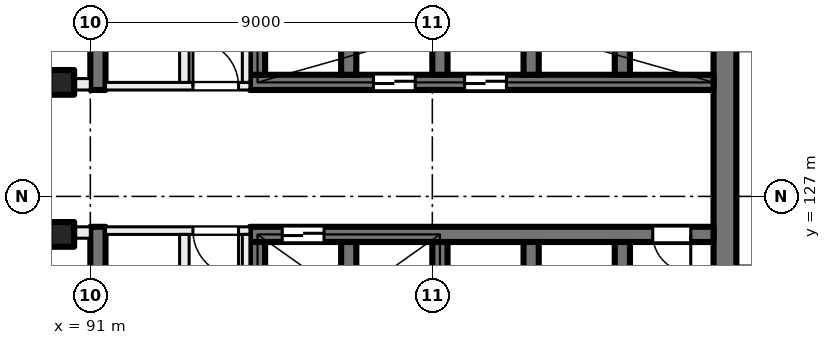
"""IFC4 building model, lengths in metres.
Left out: names, types, materials, properties, quantities, classifications, styles, units other than length and angle.
Written with IfcOpenShell. Run it as: python <this file> out.ifc"""

import sys

from ifc_helpers import new_model, si_unit, direction, frame, frame_2d, origin, origin_2d, place, context, subcontext, project, spatial, rectangle, extrude, element, fill, save


model = new_model("IFC4")
c1 = context("Model", 3, precision=1e-05, world=origin(), true_north=direction((0.0, 1.0)))
c2 = subcontext(c1, "Body", "Model", "MODEL_VIEW")
j1 = project(units=[si_unit("LENGTHUNIT", "METRE"), si_unit("PLANEANGLEUNIT", "RADIAN")], contexts=[c1])
p1 = place(None, origin())
s1 = spatial("IfcSite", under=j1, at=p1, CompositionType="ELEMENT")
p2 = place(p1, origin())
s2 = spatial("IfcBuilding", under=s1, at=p2, CompositionType="ELEMENT")
p3 = place(p2, frame((0.0, 0.0, 113.0)))
s3 = spatial("IfcBuildingStorey", under=s2, at=p3, CompositionType="ELEMENT", Elevation=113.0)
for number, where, z_axis, x_axis in (
    (1, (90.25, 130.0, 0.0), (0.0, 0.0, 1.0), (1.0, 0.0, 0.0)),
    (2, (90.25, 126.0, 0.0), (0.0, 0.0, 1.0), (1.0, 0.0, 0.0)),
):
    element("IfcColumn", number, at=place(p3, frame(where, z_axis=z_axis, x_axis=x_axis)), inside=s3, PredefinedType="COLUMN", context=c2, shape_type="SweptSolid", body=[
        extrude(rectangle(XDim=0.65, YDim=0.65, at=origin_2d()), origin(), (0.0, 0.0, 1.0), 4.0),
    ])
p4 = place(p3, frame((107.7, 135.2, 0.0), z_axis=(0.0, 0.0, 1.0), x_axis=(0.0, -1.0, 0.0)))
e3 = element("IfcWall", 3, at=p4, inside=s3, PredefinedType="SHEAR", context=c2, shape_type="SweptSolid", body=[
    extrude(rectangle(XDim=14.4, YDim=0.6, at=frame_2d((7.2, 0.0))), origin(), (0.0, 0.0, 1.0), 4.0),
])
p5 = place(p3, frame((107.4, 130.0, 0.0), z_axis=(0.0, 0.0, 1.0), x_axis=(-1.0, 0.0, 0.0)))
e4 = element("IfcWall", 4, at=p5, inside=s3, PredefinedType="SHEAR", context=c2, shape_type="SweptSolid", body=[
    extrude(rectangle(XDim=12.2, YDim=0.4, at=frame_2d((6.1, 0.0))), origin(), (0.0, 0.0, 1.0), 4.0),
])
p6 = place(p5, frame((5.45, 0.0, 0.0)))
e5 = element("IfcOpeningElement", 5, at=p6, cuts=e4, PredefinedType="OPENING", context=c2, shape_type="SweptSolid", body=[
    extrude(rectangle(XDim=1.1, YDim=2.1, at=frame_2d((0.55, 1.05))), frame((0.0, 0.21, 0.0), z_axis=(0.0, -1.0, 0.0), x_axis=(1.0, 0.0, 0.0)), (0.0, 0.0, 1.0), 0.42),
])
p7 = place(p5, frame((7.85, 0.0, 0.0)))
e6 = element("IfcOpeningElement", 6, at=p7, cuts=e4, PredefinedType="OPENING", context=c2, shape_type="SweptSolid", body=[
    extrude(rectangle(XDim=1.1, YDim=2.1, at=frame_2d((0.55, 1.05))), frame((0.0, 0.21, 0.0), z_axis=(0.0, -1.0, 0.0), x_axis=(1.0, 0.0, 0.0)), (0.0, 0.0, 1.0), 0.42),
])
for number, where, z_axis, x_axis in (
    (7, (105.0, 133.2, 0.0), (0.0, 0.0, 1.0), (0.0, -1.0, 0.0)),
    (8, (102.6, 133.2, 0.0), (0.0, 0.0, 1.0), (0.0, -1.0, 0.0)),
    (9, (100.2, 133.2, 0.0), (0.0, 0.0, 1.0), (0.0, -1.0, 0.0)),
    (10, (97.8, 133.2, 0.0), (0.0, 0.0, 1.0), (0.0, -1.0, 0.0)),
    (11, (95.4, 133.2, 0.0), (0.0, 0.0, 1.0), (0.0, -1.0, 0.0)),
):
    element("IfcWall", number, at=place(p3, frame(where, z_axis=z_axis, x_axis=x_axis)), inside=s3, PredefinedType="SHEAR", context=c2, shape_type="SweptSolid", body=[
        extrude(rectangle(XDim=3.0, YDim=0.4, at=frame_2d((1.5, 0.0))), origin(), (0.0, 0.0, 1.0), 4.0),
    ])
p8 = place(p3, frame((107.4, 126.0, 0.0), z_axis=(0.0, 0.0, 1.0), x_axis=(-1.0, 0.0, 0.0)))
e12 = element("IfcWall", 12, at=p8, inside=s3, PredefinedType="SHEAR", context=c2, shape_type="SweptSolid", body=[
    extrude(rectangle(XDim=12.2, YDim=0.4, at=frame_2d((6.1, 0.0))), origin(), (0.0, 0.0, 1.0), 4.0),
])
p9 = place(p8, frame((10.25, 0.0, 0.0)))
e13 = element("IfcOpeningElement", 13, at=p9, cuts=e12, PredefinedType="OPENING", context=c2, shape_type="SweptSolid", body=[
    extrude(rectangle(XDim=1.1, YDim=2.1, at=frame_2d((0.55, 1.05))), frame((0.0, 0.21, 0.0), z_axis=(0.0, -1.0, 0.0), x_axis=(1.0, 0.0, 0.0)), (0.0, 0.0, 1.0), 0.42),
])
p10 = place(p8, frame((0.6, 0.0, 0.0)))
e14 = element("IfcOpeningElement", 14, at=p10, cuts=e12, PredefinedType="OPENING", context=c2, shape_type="SweptSolid", body=[
    extrude(rectangle(XDim=1.0, YDim=2.1, at=frame_2d((0.5, 1.05))), frame((0.0, 0.21, 0.0), z_axis=(0.0, -1.0, 0.0), x_axis=(1.0, 0.0, 0.0)), (0.0, 0.0, 1.0), 0.42),
])
for number, where, z_axis, x_axis in (
    (15, (105.0, 125.8, 0.0), (0.0, 0.0, 1.0), (0.0, -1.0, 0.0)),
    (16, (102.6, 125.8, 0.0), (0.0, 0.0, 1.0), (0.0, -1.0, 0.0)),
    (17, (100.2, 125.8, 0.0), (0.0, 0.0, 1.0), (0.0, -1.0, 0.0)),
    (18, (97.8, 125.8, 0.0), (0.0, 0.0, 1.0), (0.0, -1.0, 0.0)),
    (19, (95.4, 125.8, 0.0), (0.0, 0.0, 1.0), (0.0, -1.0, 0.0)),
):
    element("IfcWall", number, at=place(p3, frame(where, z_axis=z_axis, x_axis=x_axis)), inside=s3, PredefinedType="SHEAR", context=c2, shape_type="SweptSolid", body=[
        extrude(rectangle(XDim=3.0, YDim=0.4, at=frame_2d((1.5, 0.0))), origin(), (0.0, 0.0, 1.0), 4.0),
    ])
for number, where, z_axis, x_axis in (
    (20, (91.2, 138.4, 0.0), (0.0, 0.0, 1.0), (0.0, -1.0, 0.0)),
    (21, (91.2, 126.2, 0.0), (0.0, 0.0, 1.0), (0.0, -1.0, 0.0)),
):
    element("IfcWall", number, at=place(p3, frame(where, z_axis=z_axis, x_axis=x_axis)), inside=s3, PredefinedType="SHEAR", context=c2, shape_type="SweptSolid", body=[
        extrude(rectangle(XDim=8.6, YDim=0.4, at=frame_2d((4.3, 0.0))), origin(), (0.0, 0.0, 1.0), 4.0),
    ])
p11 = place(p3, frame((95.2, 126.1, 0.0), z_axis=(0.0, 0.0, 1.0), x_axis=(-1.0, 0.0, 0.0)))
e22 = element("IfcWall", 22, at=p11, inside=s3, PredefinedType="PARTITIONING", context=c2, shape_type="SweptSolid", body=[
    extrude(rectangle(XDim=3.8, YDim=0.2, at=frame_2d((1.9, 0.0))), origin(), (0.0, 0.0, 1.0), 3.625),
])
p12 = place(p11, frame((0.3, 0.0, 0.0)))
e23 = element("IfcOpeningElement", 23, at=p12, cuts=e22, PredefinedType="OPENING", context=c2, shape_type="SweptSolid", body=[
    extrude(rectangle(XDim=1.2, YDim=2.1, at=frame_2d((0.6, 1.05))), frame((0.0, 0.11, 0.0), z_axis=(0.0, -1.0, 0.0), x_axis=(1.0, 0.0, 0.0)), (0.0, 0.0, 1.0), 0.22),
])
p13 = place(p3, frame((95.1, 117.6, 0.0), z_axis=(0.0, 0.0, 1.0), x_axis=(0.0, 1.0, 0.0)))
e24 = element("IfcWall", 24, at=p13, inside=s3, PredefinedType="PARTITIONING", context=c2, shape_type="SweptSolid", body=[
    extrude(rectangle(XDim=8.4, YDim=0.2, at=frame_2d((4.2, 0.0))), origin(), (0.0, 0.0, 1.0), 3.625),
])
p14 = place(p13, frame((1.65, 0.0, 0.0)))
e25 = element("IfcOpeningElement", 25, at=p14, cuts=e24, PredefinedType="OPENING", context=c2, shape_type="SweptSolid", body=[
    extrude(rectangle(XDim=1.5, YDim=2.1, at=frame_2d((0.75, 1.05))), frame((0.0, 0.11, 0.0), z_axis=(0.0, -1.0, 0.0), x_axis=(1.0, 0.0, 0.0)), (0.0, 0.0, 1.0), 0.22),
])
p15 = place(p3, frame((93.475, 117.6, 0.0), z_axis=(0.0, 0.0, 1.0), x_axis=(0.0, 1.0, 0.0)))
e26 = element("IfcWall", 26, at=p15, inside=s3, PredefinedType="PARTITIONING", context=c2, shape_type="SweptSolid", body=[
    extrude(rectangle(XDim=8.4, YDim=0.25, at=frame_2d((4.2, 0.0))), origin(), (0.0, 0.0, 1.0), 3.625),
])
p16 = place(p15, frame((6.625, 0.0, 0.0)))
e27 = element("IfcOpeningElement", 27, at=p16, cuts=e26, PredefinedType="OPENING", context=c2, shape_type="SweptSolid", body=[
    extrude(rectangle(XDim=0.8, YDim=2.1, at=frame_2d((0.4, 1.05))), frame((0.0, 0.135, 0.0), z_axis=(0.0, -1.0, 0.0), x_axis=(1.0, 0.0, 0.0)), (0.0, 0.0, 1.0), 0.27),
])
p17 = place(p15, frame((2.375, 0.0, 0.0)))
e28 = element("IfcOpeningElement", 28, at=p17, cuts=e26, PredefinedType="OPENING", context=c2, shape_type="SweptSolid", body=[
    extrude(rectangle(XDim=0.8, YDim=2.1, at=frame_2d((0.4, 1.05))), frame((0.0, 0.135, 0.0), z_axis=(0.0, -1.0, 0.0), x_axis=(1.0, 0.0, 0.0)), (0.0, 0.0, 1.0), 0.27),
])
p18 = place(p3, frame((91.4, 129.9, 0.0), z_axis=(0.0, 0.0, 1.0), x_axis=(1.0, 0.0, 0.0)))
e29 = element("IfcWall", 29, at=p18, inside=s3, PredefinedType="PARTITIONING", context=c2, shape_type="SweptSolid", body=[
    extrude(rectangle(XDim=3.8, YDim=0.2, at=frame_2d((1.9, 0.0))), origin(), (0.0, 0.0, 1.0), 3.625),
])
p19 = place(p18, frame((2.3, 0.0, 0.0)))
e30 = element("IfcOpeningElement", 30, at=p19, cuts=e29, PredefinedType="OPENING", context=c2, shape_type="SweptSolid", body=[
    extrude(rectangle(XDim=1.2, YDim=2.1, at=frame_2d((0.6, 1.05))), frame((0.0, 0.11, 0.0), z_axis=(0.0, -1.0, 0.0), x_axis=(1.0, 0.0, 0.0)), (0.0, 0.0, 1.0), 0.22),
])
p20 = place(p3, frame((95.1, 130.0, 0.0), z_axis=(0.0, 0.0, 1.0), x_axis=(0.0, 1.0, 0.0)))
e31 = element("IfcWall", 31, at=p20, inside=s3, PredefinedType="PARTITIONING", context=c2, shape_type="SweptSolid", body=[
    extrude(rectangle(XDim=8.4, YDim=0.2, at=frame_2d((4.2, 0.0))), origin(), (0.0, 0.0, 1.0), 3.625),
])
p21 = place(p20, frame((5.25, 0.0, 0.0)))
e32 = element("IfcOpeningElement", 32, at=p21, cuts=e31, PredefinedType="OPENING", context=c2, shape_type="SweptSolid", body=[
    extrude(rectangle(XDim=1.5, YDim=2.1, at=frame_2d((0.75, 1.05))), frame((0.0, 0.11, 0.0), z_axis=(0.0, -1.0, 0.0), x_axis=(1.0, 0.0, 0.0)), (0.0, 0.0, 1.0), 0.22),
])
p22 = place(p3, frame((93.475, 130.0, 0.0), z_axis=(0.0, 0.0, 1.0), x_axis=(0.0, 1.0, 0.0)))
e33 = element("IfcWall", 33, at=p22, inside=s3, PredefinedType="PARTITIONING", context=c2, shape_type="SweptSolid", body=[
    extrude(rectangle(XDim=8.4, YDim=0.25, at=frame_2d((4.2, 0.0))), origin(), (0.0, 0.0, 1.0), 3.625),
])
p23 = place(p22, frame((2.275, 0.0, 0.0)))
e34 = element("IfcOpeningElement", 34, at=p23, cuts=e33, PredefinedType="OPENING", context=c2, shape_type="SweptSolid", body=[
    extrude(rectangle(XDim=1.0, YDim=2.1, at=frame_2d((0.5, 1.05))), frame((0.0, 0.135, 0.0), z_axis=(0.0, -1.0, 0.0), x_axis=(1.0, 0.0, 0.0)), (0.0, 0.0, 1.0), 0.27),
])
p24 = place(p22, frame((6.625, 0.0, 0.0)))
e35 = element("IfcOpeningElement", 35, at=p24, cuts=e33, PredefinedType="OPENING", context=c2, shape_type="SweptSolid", body=[
    extrude(rectangle(XDim=0.8, YDim=2.1, at=frame_2d((0.4, 1.05))), frame((0.0, 0.135, 0.0), z_axis=(0.0, -1.0, 0.0), x_axis=(1.0, 0.0, 0.0)), (0.0, 0.0, 1.0), 0.27),
])
p25 = place(p3, frame((72.5, 129.95, 0.0), z_axis=(0.0, 0.0, 1.0), x_axis=(1.0, 0.0, 0.0)))
e36 = element("IfcWall", 36, at=p25, inside=s3, PredefinedType="PARTITIONING", context=c2, shape_type="SweptSolid", body=[
    extrude(rectangle(XDim=18.5, YDim=0.3, at=frame_2d((9.25, 0.0))), origin(), (0.0, 0.0, 1.0), 3.625),
])
p26 = place(p25, frame((14.375, 0.0, 0.0)))
e37 = element("IfcOpeningElement", 37, at=p26, cuts=e36, PredefinedType="OPENING", context=c2, shape_type="SweptSolid", body=[
    extrude(rectangle(XDim=1.0, YDim=2.1, at=frame_2d((0.5, 1.05))), frame((0.0, 0.16, 0.0), z_axis=(0.0, -1.0, 0.0), x_axis=(1.0, 0.0, 0.0)), (0.0, 0.0, 1.0), 0.32),
])
p27 = place(p25, frame((6.0, 0.0, 0.0)))
e38 = element("IfcOpeningElement", 38, at=p27, cuts=e36, PredefinedType="OPENING", context=c2, shape_type="SweptSolid", body=[
    extrude(rectangle(XDim=1.0, YDim=2.1, at=frame_2d((0.5, 1.05))), frame((0.0, 0.16, 0.0), z_axis=(0.0, -1.0, 0.0), x_axis=(1.0, 0.0, 0.0)), (0.0, 0.0, 1.0), 0.32),
])
p28 = place(p25, frame((1.625, 0.0, 0.0)))
e39 = element("IfcOpeningElement", 39, at=p28, cuts=e36, PredefinedType="OPENING", context=c2, shape_type="SweptSolid", body=[
    extrude(rectangle(XDim=1.0, YDim=2.1, at=frame_2d((0.5, 1.05))), frame((0.0, 0.16, 0.0), z_axis=(0.0, -1.0, 0.0), x_axis=(1.0, 0.0, 0.0)), (0.0, 0.0, 1.0), 0.32),
])
p29 = place(p3, frame((91.0, 126.05, 0.0), z_axis=(0.0, 0.0, 1.0), x_axis=(-1.0, 0.0, 0.0)))
e40 = element("IfcWall", 40, at=p29, inside=s3, PredefinedType="PARTITIONING", context=c2, shape_type="SweptSolid", body=[
    extrude(rectangle(XDim=43.785, YDim=0.3, at=frame_2d((21.893, 0.0))), origin(), (0.0, 0.0, 1.0), 3.625),
])
p30 = place(p29, frame((2.025, 0.0, 0.0)))
e41 = element("IfcOpeningElement", 41, at=p30, cuts=e40, PredefinedType="OPENING", context=c2, shape_type="SweptSolid", body=[
    extrude(rectangle(XDim=1.2, YDim=2.1, at=frame_2d((0.6, 1.05))), frame((0.0, 0.16, 0.0), z_axis=(0.0, -1.0, 0.0), x_axis=(1.0, 0.0, 0.0)), (0.0, 0.0, 1.0), 0.32),
])
p31 = place(p29, frame((7.0, 0.0, 0.0)))
e42 = element("IfcOpeningElement", 42, at=p31, cuts=e40, PredefinedType="OPENING", context=c2, shape_type="SweptSolid", body=[
    extrude(rectangle(XDim=1.0, YDim=2.1, at=frame_2d((0.5, 1.05))), frame((0.0, 0.16, 0.0), z_axis=(0.0, -1.0, 0.0), x_axis=(1.0, 0.0, 0.0)), (0.0, 0.0, 1.0), 0.32),
])
p32 = place(p29, frame((16.0, 0.0, 0.0)))
e43 = element("IfcOpeningElement", 43, at=p32, cuts=e40, PredefinedType="OPENING", context=c2, shape_type="SweptSolid", body=[
    extrude(rectangle(XDim=1.0, YDim=2.1, at=frame_2d((0.5, 1.05))), frame((0.0, 0.16, 0.0), z_axis=(0.0, -1.0, 0.0), x_axis=(1.0, 0.0, 0.0)), (0.0, 0.0, 1.0), 0.32),
])
p33 = place(p29, frame((28.85, 0.0, 0.0)))
e44 = element("IfcOpeningElement", 44, at=p33, cuts=e40, PredefinedType="OPENING", context=c2, shape_type="SweptSolid", body=[
    extrude(rectangle(XDim=1.8, YDim=2.1, at=frame_2d((0.9, 1.05))), frame((0.0, 0.16, 0.0), z_axis=(0.0, -1.0, 0.0), x_axis=(1.0, 0.0, 0.0)), (0.0, 0.0, 1.0), 0.32),
])
p34 = place(p29, frame((39.296, 0.0, 0.0)))
e45 = element("IfcOpeningElement", 45, at=p34, cuts=e40, PredefinedType="OPENING", context=c2, shape_type="SweptSolid", body=[
    extrude(rectangle(XDim=1.8, YDim=2.1, at=frame_2d((0.9, 1.05))), frame((0.0, 0.16, 0.0), z_axis=(0.0, -1.0, 0.0), x_axis=(1.0, 0.0, 0.0)), (0.0, 0.0, 1.0), 0.32),
])
p35 = place(p9, origin())
e46 = element("IfcDoor", 46, at=p35, inside=s3, OperationType="DOUBLE_DOOR_SLIDING", PredefinedType="DOOR", context=c2, shape_type="SweptSolid", body=[
    extrude(rectangle(XDim=1.1, YDim=2.1, at=frame_2d((0.55, 1.05))), frame((0.0, 0.025, 0.0), z_axis=(0.0, -1.0, 0.0), x_axis=(1.0, 0.0, 0.0)), (0.0, 0.0, 1.0), 0.05),
])
fill(e13, e46)
p36 = place(p6, origin())
e47 = element("IfcDoor", 47, at=p36, inside=s3, OperationType="DOUBLE_DOOR_SLIDING", PredefinedType="DOOR", context=c2, shape_type="SweptSolid", body=[
    extrude(rectangle(XDim=1.1, YDim=2.1, at=frame_2d((0.55, 1.05))), frame((0.0, 0.025, 0.0), z_axis=(0.0, -1.0, 0.0), x_axis=(1.0, 0.0, 0.0)), (0.0, 0.0, 1.0), 0.05),
])
fill(e5, e47)
p37 = place(p7, origin())
e48 = element("IfcDoor", 48, at=p37, inside=s3, OperationType="DOUBLE_DOOR_SLIDING", PredefinedType="DOOR", context=c2, shape_type="SweptSolid", body=[
    extrude(rectangle(XDim=1.1, YDim=2.1, at=frame_2d((0.55, 1.05))), frame((0.0, 0.025, 0.0), z_axis=(0.0, -1.0, 0.0), x_axis=(1.0, 0.0, 0.0)), (0.0, 0.0, 1.0), 0.05),
])
fill(e6, e48)
p38 = place(p10, origin())
e49 = element("IfcDoor", 49, at=p38, inside=s3, OperationType="SINGLE_SWING_LEFT", PredefinedType="DOOR", context=c2, shape_type="SweptSolid", body=[
    extrude(rectangle(XDim=1.0, YDim=2.1, at=frame_2d((0.5, 1.05))), frame((0.0, 0.025, 0.0), z_axis=(0.0, -1.0, 0.0), x_axis=(1.0, 0.0, 0.0)), (0.0, 0.0, 1.0), 0.05),
])
fill(e14, e49)
p39 = place(p12, origin())
e50 = element("IfcDoor", 50, at=p39, inside=s3, OperationType="DOUBLE_DOOR_SINGLE_SWING", PredefinedType="DOOR", context=c2, shape_type="SweptSolid", body=[
    extrude(rectangle(XDim=1.2, YDim=2.1, at=frame_2d((0.6, 1.05))), frame((0.0, 0.025, 0.0), z_axis=(0.0, -1.0, 0.0), x_axis=(1.0, 0.0, 0.0)), (0.0, 0.0, 1.0), 0.05),
])
fill(e23, e50)
p40 = place(p19, origin())
e51 = element("IfcDoor", 51, at=p40, inside=s3, OperationType="DOUBLE_DOOR_SINGLE_SWING", PredefinedType="DOOR", context=c2, shape_type="SweptSolid", body=[
    extrude(rectangle(XDim=1.2, YDim=2.1, at=frame_2d((0.6, 1.05))), frame((0.0, 0.025, 0.0), z_axis=(0.0, -1.0, 0.0), x_axis=(1.0, 0.0, 0.0)), (0.0, 0.0, 1.0), 0.05),
])
fill(e30, e51)
save(model, sys.argv[1])
